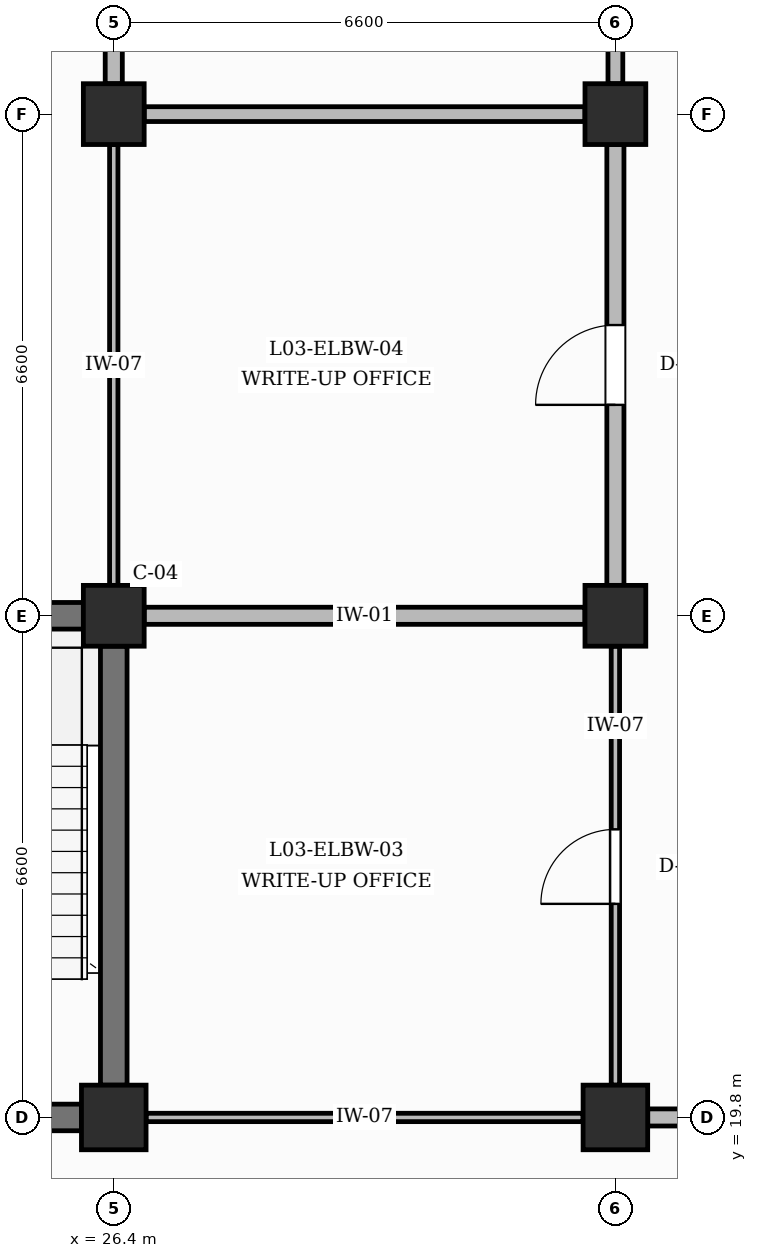
"""IFC4 building model, lengths in metres.
Left out: names, types, materials, properties, quantities, classifications, styles, units other than length and angle.
Written with IfcOpenShell. Run it as: python <this file> out.ifc"""

import sys

from ifc_helpers import new_model, si_unit, direction, frame, frame_2d, origin, origin_2d, place, context, subcontext, project, spatial, rectangle, extrude, element, fill, save


model = new_model("IFC4")
c1 = context("Model", 3, precision=1e-05, world=origin(), true_north=direction((0.0, 1.0)))
c2 = subcontext(c1, "Body", "Model", "MODEL_VIEW")
j1 = project(units=[si_unit("LENGTHUNIT", "METRE"), si_unit("PLANEANGLEUNIT", "RADIAN")], contexts=[c1])
p1 = place(None, origin())
s1 = spatial("IfcSite", under=j1, at=p1, CompositionType="ELEMENT")
p2 = place(p1, origin())
s2 = spatial("IfcBuilding", under=s1, at=p2, CompositionType="ELEMENT")
p3 = place(p2, frame((0.0, 0.0, 14.4)))
s3 = spatial("IfcBuildingStorey", under=s2, at=p3, CompositionType="ELEMENT", Elevation=14.4)
p4 = place(p3, frame((26.4, 19.8, 0.0), z_axis=(0.0, 0.0, 1.0), x_axis=(1.0, 0.0, 0.0)))
e1 = element("IfcColumn", 1, at=p4, inside=s3, PredefinedType="COLUMN", context=c2, shape_type="SweptSolid", body=[
    extrude(rectangle(XDim=0.85, YDim=0.85, at=origin_2d()), origin(), (0.0, 0.0, 1.0), 4.2),
])
for number, where, z_axis, x_axis in (
    (2, (26.4, 26.4, 0.0), (0.0, 0.0, 1.0), (1.0, 0.0, 0.0)),
    (3, (26.4, 33.0, 0.0), (0.0, 0.0, 1.0), (1.0, 0.0, 0.0)),
):
    element("IfcColumn", number, at=place(p3, frame(where, z_axis=z_axis, x_axis=x_axis)), inside=s3, PredefinedType="COLUMN", context=c2, shape_type="SweptSolid", body=[
        extrude(rectangle(XDim=0.8, YDim=0.8, at=origin_2d()), origin(), (0.0, 0.0, 1.0), 4.2),
    ])
p5 = place(p3, frame((33.0, 19.8, 0.0), z_axis=(0.0, 0.0, 1.0), x_axis=(1.0, 0.0, 0.0)))
e4 = element("IfcColumn", 4, at=p5, inside=s3, PredefinedType="COLUMN", context=c2, shape_type="SweptSolid", body=[
    extrude(rectangle(XDim=0.85, YDim=0.85, at=origin_2d()), origin(), (0.0, 0.0, 1.0), 4.2),
])
for number, where, z_axis, x_axis in (
    (5, (33.0, 26.4, 0.0), (0.0, 0.0, 1.0), (1.0, 0.0, 0.0)),
    (6, (33.0, 33.0, 0.0), (0.0, 0.0, 1.0), (1.0, 0.0, 0.0)),
):
    element("IfcColumn", number, at=place(p3, frame(where, z_axis=z_axis, x_axis=x_axis)), inside=s3, PredefinedType="COLUMN", context=c2, shape_type="SweptSolid", body=[
        extrude(rectangle(XDim=0.8, YDim=0.8, at=origin_2d()), origin(), (0.0, 0.0, 1.0), 4.2),
    ])
p6 = place(p3, frame((20.225, 19.8, 0.0), z_axis=(0.0, 0.0, 1.0), x_axis=(1.0, 0.0, 0.0)))
e7 = element("IfcWall", 7, at=p6, inside=s3, PredefinedType="SHEAR", context=c2, shape_type="SweptSolid", body=[
    extrude(rectangle(XDim=5.75, YDim=0.35, at=frame_2d((2.875, 0.0))), origin(), (0.0, 0.0, 1.0), 3.16),
])
p7 = place(p6, frame((2.325, 0.0, 0.0)))
e8 = element("IfcOpeningElement", 8, at=p7, cuts=e7, PredefinedType="OPENING", context=c2, shape_type="SweptSolid", body=[
    extrude(rectangle(XDim=1.1, YDim=2.15, at=frame_2d((0.55, 1.075))), frame((0.0, 0.185, 0.0), z_axis=(0.0, -1.0, 0.0), x_axis=(1.0, 0.0, 0.0)), (0.0, 0.0, 1.0), 0.37),
])
for number, where, z_axis, x_axis in (
    (9, (20.225, 26.4, 0.0), (0.0, 0.0, 1.0), (1.0, 0.0, 0.0)),
    (10, (26.4, 20.225, 0.0), (0.0, 0.0, 1.0), (0.0, 1.0, 0.0)),
):
    element("IfcWall", number, at=place(p3, frame(where, z_axis=z_axis, x_axis=x_axis)), inside=s3, PredefinedType="SHEAR", context=c2, shape_type="SweptSolid", body=[
        extrude(rectangle(XDim=5.775, YDim=0.35, at=frame_2d((2.887, 0.0))), origin(), (0.0, 0.0, 1.0), 3.16),
    ])
p8 = place(p3, frame((26.4, 26.8, 0.0), z_axis=(0.0, 0.0, 1.0), x_axis=(0.0, 1.0, 0.0)))
e11 = element("IfcWall", 11, at=p8, inside=s3, PredefinedType="PARTITIONING", context=c2, shape_type="SweptSolid", body=[
    extrude(rectangle(XDim=5.8, YDim=0.11, at=frame_2d((2.9, 0.0))), origin(), (0.0, 0.0, 1.0), 3.16),
])
p9 = place(p3, frame((26.4, 33.4, 0.0), z_axis=(0.0, 0.0, 1.0), x_axis=(0.0, 1.0, 0.0)))
e12 = element("IfcWall", 12, at=p9, inside=s3, PredefinedType="PARTITIONING", context=c2, shape_type="SweptSolid", body=[
    extrude(rectangle(XDim=5.8, YDim=0.225, at=frame_2d((2.9, 0.0))), origin(), (0.0, 0.0, 1.0), 3.16),
])
p10 = place(p3, frame((26.825, 19.8, 0.0), z_axis=(0.0, 0.0, 1.0), x_axis=(1.0, 0.0, 0.0)))
e13 = element("IfcWall", 13, at=p10, inside=s3, PredefinedType="PARTITIONING", context=c2, shape_type="SweptSolid", body=[
    extrude(rectangle(XDim=5.75, YDim=0.11, at=frame_2d((2.875, 0.0))), origin(), (0.0, 0.0, 1.0), 3.16),
])
p11 = place(p3, frame((33.0, 20.225, 0.0), z_axis=(0.0, 0.0, 1.0), x_axis=(0.0, 1.0, 0.0)))
e14 = element("IfcWall", 14, at=p11, inside=s3, PredefinedType="PARTITIONING", context=c2, shape_type="SweptSolid", body=[
    extrude(rectangle(XDim=5.775, YDim=0.11, at=frame_2d((2.887, 0.0))), origin(), (0.0, 0.0, 1.0), 3.16),
])
p12 = place(p11, frame((2.385, 0.0, 0.0)))
e15 = element("IfcOpeningElement", 15, at=p12, cuts=e14, PredefinedType="OPENING", context=c2, shape_type="SweptSolid", body=[
    extrude(rectangle(XDim=0.98, YDim=2.15, at=frame_2d((0.49, 1.075))), frame((0.0, 0.065, 0.0), z_axis=(0.0, -1.0, 0.0), x_axis=(1.0, 0.0, 0.0)), (0.0, 0.0, 1.0), 0.13),
])
p13 = place(p3, frame((26.8, 26.4, 0.0), z_axis=(0.0, 0.0, 1.0), x_axis=(1.0, 0.0, 0.0)))
e16 = element("IfcWall", 16, at=p13, inside=s3, PredefinedType="PARTITIONING", context=c2, shape_type="SweptSolid", body=[
    extrude(rectangle(XDim=5.8, YDim=0.225, at=frame_2d((2.9, 0.0))), origin(), (0.0, 0.0, 1.0), 3.16),
])
p14 = place(p3, frame((33.0, 26.8, 0.0), z_axis=(0.0, 0.0, 1.0), x_axis=(0.0, 1.0, 0.0)))
e17 = element("IfcWall", 17, at=p14, inside=s3, PredefinedType="PARTITIONING", context=c2, shape_type="SweptSolid", body=[
    extrude(rectangle(XDim=5.8, YDim=0.225, at=frame_2d((2.9, 0.0))), origin(), (0.0, 0.0, 1.0), 3.16),
])
p15 = place(p14, frame((2.375, 0.0, 0.0)))
e18 = element("IfcOpeningElement", 18, at=p15, cuts=e17, PredefinedType="OPENING", context=c2, shape_type="SweptSolid", body=[
    extrude(rectangle(XDim=1.05, YDim=2.15, at=frame_2d((0.525, 1.075))), frame((0.0, 0.123, 0.0), z_axis=(0.0, -1.0, 0.0), x_axis=(1.0, 0.0, 0.0)), (0.0, 0.0, 1.0), 0.245),
])
p16 = place(p3, frame((26.8, 33.0, 0.0), z_axis=(0.0, 0.0, 1.0), x_axis=(1.0, 0.0, 0.0)))
e19 = element("IfcWall", 19, at=p16, inside=s3, PredefinedType="PARTITIONING", context=c2, shape_type="SweptSolid", body=[
    extrude(rectangle(XDim=5.8, YDim=0.195, at=frame_2d((2.9, 0.0))), origin(), (0.0, 0.0, 1.0), 3.16),
])
p17 = place(p3, frame((33.0, 33.4, 0.0), z_axis=(0.0, 0.0, 1.0), x_axis=(0.0, 1.0, 0.0)))
e20 = element("IfcWall", 20, at=p17, inside=s3, PredefinedType="PARTITIONING", context=c2, shape_type="SweptSolid", body=[
    extrude(rectangle(XDim=5.8, YDim=0.195, at=frame_2d((2.9, 0.0))), origin(), (0.0, 0.0, 1.0), 3.16),
])
p18 = place(p17, frame((2.36, 0.0, 0.0)))
e21 = element("IfcOpeningElement", 21, at=p18, cuts=e20, PredefinedType="OPENING", context=c2, shape_type="SweptSolid", body=[
    extrude(rectangle(XDim=1.08, YDim=2.15, at=frame_2d((0.54, 1.075))), frame((0.0, 0.107, 0.0), z_axis=(0.0, -1.0, 0.0), x_axis=(1.0, 0.0, 0.0)), (0.0, 0.0, 1.0), 0.215),
])
p19 = place(p3, frame((33.425, 19.8, 0.0), z_axis=(0.0, 0.0, 1.0), x_axis=(1.0, 0.0, 0.0)))
e22 = element("IfcWall", 22, at=p19, inside=s3, PredefinedType="PARTITIONING", context=c2, shape_type="SweptSolid", body=[
    extrude(rectangle(XDim=5.775, YDim=0.225, at=frame_2d((2.887, 0.0))), origin(), (0.0, 0.0, 1.0), 3.16),
])
p20 = place(p19, frame((2.075, 0.0, 0.0)))
e23 = element("IfcOpeningElement", 23, at=p20, cuts=e22, PredefinedType="OPENING", context=c2, shape_type="SweptSolid", body=[
    extrude(rectangle(XDim=1.6, YDim=2.2, at=frame_2d((0.8, 1.1))), frame((0.0, 0.123, 0.0), z_axis=(0.0, -1.0, 0.0), x_axis=(1.0, 0.0, 0.0)), (0.0, 0.0, 1.0), 0.245),
])
p21 = place(p12, origin())
e24 = element("IfcDoor", 24, at=p21, inside=s3, OperationType="SINGLE_SWING_LEFT", PredefinedType="DOOR", context=c2, shape_type="SweptSolid", body=[
    extrude(rectangle(XDim=0.98, YDim=2.15, at=frame_2d((0.49, 1.075))), frame((0.0, 0.025, 0.0), z_axis=(0.0, -1.0, 0.0), x_axis=(1.0, 0.0, 0.0)), (0.0, 0.0, 1.0), 0.05),
])
fill(e15, e24)
p22 = place(p15, origin())
e25 = element("IfcDoor", 25, at=p22, inside=s3, OperationType="SINGLE_SWING_LEFT", PredefinedType="DOOR", context=c2, shape_type="SweptSolid", body=[
    extrude(rectangle(XDim=1.05, YDim=2.15, at=frame_2d((0.525, 1.075))), frame((0.0, 0.025, 0.0), z_axis=(0.0, -1.0, 0.0), x_axis=(1.0, 0.0, 0.0)), (0.0, 0.0, 1.0), 0.05),
])
fill(e18, e25)
save(model, sys.argv[1])
